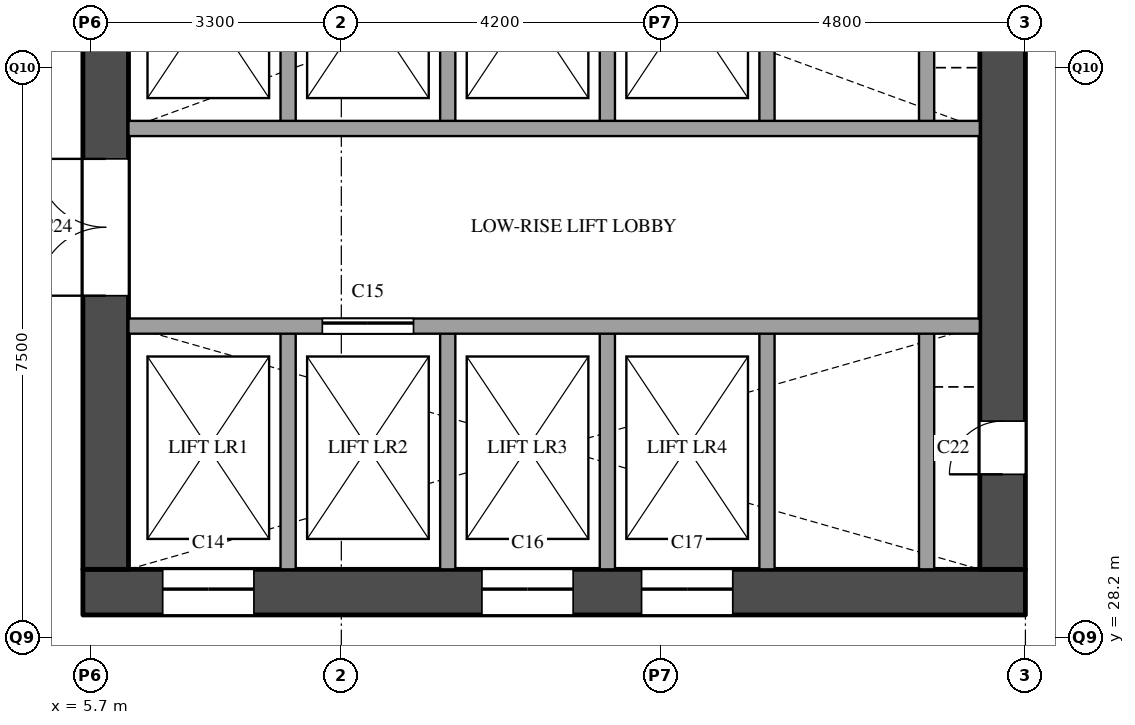
"""IFC4 building model, lengths in metres.
Left out: names, types, materials, properties, quantities, classifications, styles, units other than length and angle.
Written with IfcOpenShell. Run it as: python <this file> out.ifc"""

import sys

from ifc_helpers import new_model, si_unit, direction, frame, frame_2d, origin, place, context, subcontext, project, spatial, rectangle, extrude, element, fill, save


model = new_model("IFC4")
c1 = context("Model", 3, precision=1e-05, world=origin(), true_north=direction((0.0, 1.0)))
c2 = subcontext(c1, "Body", "Model", "MODEL_VIEW")
j1 = project(units=[si_unit("LENGTHUNIT", "METRE"), si_unit("PLANEANGLEUNIT", "RADIAN")], contexts=[c1])
p1 = place(None, origin())
s1 = spatial("IfcSite", under=j1, at=p1, CompositionType="ELEMENT")
p2 = place(p1, origin())
s2 = spatial("IfcBuilding", under=s1, at=p2, CompositionType="ELEMENT")
p3 = place(p2, frame((0.0, 0.0, 42.4)))
s3 = spatial("IfcBuildingStorey", under=s2, at=p3, CompositionType="ELEMENT", Elevation=42.4)
p4 = place(p3, frame((5.6, 28.8, 0.0), z_axis=(0.0, 0.0, 1.0), x_axis=(1.0, 0.0, 0.0)))
e1 = element("IfcWall", 1, at=p4, inside=s3, PredefinedType="SHEAR", context=c2, shape_type="SweptSolid", body=[
    extrude(rectangle(XDim=12.4, YDim=0.6, at=frame_2d((6.2, 0.0))), origin(), (0.0, 0.0, 1.0), 3.5),
])
p5 = place(p4, frame((1.05, 0.0, 0.0)))
e2 = element("IfcOpeningElement", 2, at=p5, cuts=e1, PredefinedType="OPENING", context=c2, shape_type="SweptSolid", body=[
    extrude(rectangle(XDim=1.2, YDim=2.1, at=frame_2d((0.6, 1.05))), frame((0.0, 0.31, 0.0), z_axis=(0.0, -1.0, 0.0), x_axis=(1.0, 0.0, 0.0)), (0.0, 0.0, 1.0), 0.62),
])
p6 = place(p4, frame((5.25, 0.0, 0.0)))
e3 = element("IfcOpeningElement", 3, at=p6, cuts=e1, PredefinedType="OPENING", context=c2, shape_type="SweptSolid", body=[
    extrude(rectangle(XDim=1.2, YDim=2.1, at=frame_2d((0.6, 1.05))), frame((0.0, 0.31, 0.0), z_axis=(0.0, -1.0, 0.0), x_axis=(1.0, 0.0, 0.0)), (0.0, 0.0, 1.0), 0.62),
])
p7 = place(p4, frame((7.35, 0.0, 0.0)))
e4 = element("IfcOpeningElement", 4, at=p7, cuts=e1, PredefinedType="OPENING", context=c2, shape_type="SweptSolid", body=[
    extrude(rectangle(XDim=1.2, YDim=2.1, at=frame_2d((0.6, 1.05))), frame((0.0, 0.31, 0.0), z_axis=(0.0, -1.0, 0.0), x_axis=(1.0, 0.0, 0.0)), (0.0, 0.0, 1.0), 0.62),
])
p8 = place(p3, frame((5.9, 29.1, 0.0), z_axis=(0.0, 0.0, 1.0), x_axis=(0.0, 1.0, 0.0)))
e5 = element("IfcWall", 5, at=p8, inside=s3, PredefinedType="SHEAR", context=c2, shape_type="SweptSolid", body=[
    extrude(rectangle(XDim=20.3, YDim=0.6, at=frame_2d((10.15, 0.0))), origin(), (0.0, 0.0, 1.0), 3.5),
])
p9 = place(p8, frame((3.6, 0.0, 0.0)))
e6 = element("IfcOpeningElement", 6, at=p9, cuts=e5, PredefinedType="OPENING", context=c2, shape_type="SweptSolid", body=[
    extrude(rectangle(XDim=1.8, YDim=2.1, at=frame_2d((0.9, 1.05))), frame((0.0, 0.31, 0.0), z_axis=(0.0, -1.0, 0.0), x_axis=(1.0, 0.0, 0.0)), (0.0, 0.0, 1.0), 0.62),
])
p10 = place(p8, frame((16.4, 0.0, 0.0)))
e7 = element("IfcOpeningElement", 7, at=p10, cuts=e5, PredefinedType="OPENING", context=c2, shape_type="SweptSolid", body=[
    extrude(rectangle(XDim=1.0, YDim=2.1, at=frame_2d((0.5, 1.05))), frame((0.0, 0.31, 0.0), z_axis=(0.0, -1.0, 0.0), x_axis=(1.0, 0.0, 0.0)), (0.0, 0.0, 1.0), 0.62),
])
p11 = place(p3, frame((17.7, 29.1, 0.0), z_axis=(0.0, 0.0, 1.0), x_axis=(0.0, 1.0, 0.0)))
e8 = element("IfcWall", 8, at=p11, inside=s3, PredefinedType="SHEAR", context=c2, shape_type="SweptSolid", body=[
    extrude(rectangle(XDim=20.3, YDim=0.6, at=frame_2d((10.15, 0.0))), origin(), (0.0, 0.0, 1.0), 3.5),
])
p12 = place(p11, frame((1.25, 0.0, 0.0)))
e9 = element("IfcOpeningElement", 9, at=p12, cuts=e8, PredefinedType="OPENING", context=c2, shape_type="SweptSolid", body=[
    extrude(rectangle(XDim=0.7, YDim=2.1, at=frame_2d((0.35, 1.05))), frame((0.0, 0.31, 0.0), z_axis=(0.0, -1.0, 0.0), x_axis=(1.0, 0.0, 0.0)), (0.0, 0.0, 1.0), 0.62),
])
p13 = place(p11, frame((7.05, 0.0, 0.0)))
e10 = element("IfcOpeningElement", 10, at=p13, cuts=e8, PredefinedType="OPENING", context=c2, shape_type="SweptSolid", body=[
    extrude(rectangle(XDim=0.7, YDim=2.1, at=frame_2d((0.35, 1.05))), frame((0.0, 0.31, 0.0), z_axis=(0.0, -1.0, 0.0), x_axis=(1.0, 0.0, 0.0)), (0.0, 0.0, 1.0), 0.62),
])
p14 = place(p3, frame((8.3, 29.1, 0.0), z_axis=(0.0, 0.0, 1.0), x_axis=(0.0, 1.0, 0.0)))
e11 = element("IfcWall", 11, at=p14, inside=s3, PredefinedType="SOLIDWALL", context=c2, shape_type="SweptSolid", body=[
    extrude(rectangle(XDim=3.2, YDim=0.2, at=frame_2d((1.6, 0.0))), origin(), (0.0, 0.0, 1.0), 3.5),
])
p15 = place(p3, frame((8.3, 34.9, 0.0), z_axis=(0.0, 0.0, 1.0), x_axis=(0.0, 1.0, 0.0)))
e12 = element("IfcWall", 12, at=p15, inside=s3, PredefinedType="SOLIDWALL", context=c2, shape_type="SweptSolid", body=[
    extrude(rectangle(XDim=3.2, YDim=0.2, at=frame_2d((1.6, 0.0))), origin(), (0.0, 0.0, 1.0), 3.5),
])
p16 = place(p3, frame((10.4, 29.1, 0.0), z_axis=(0.0, 0.0, 1.0), x_axis=(0.0, 1.0, 0.0)))
e13 = element("IfcWall", 13, at=p16, inside=s3, PredefinedType="SOLIDWALL", context=c2, shape_type="SweptSolid", body=[
    extrude(rectangle(XDim=3.2, YDim=0.2, at=frame_2d((1.6, 0.0))), origin(), (0.0, 0.0, 1.0), 3.5),
])
p17 = place(p3, frame((10.4, 34.9, 0.0), z_axis=(0.0, 0.0, 1.0), x_axis=(0.0, 1.0, 0.0)))
e14 = element("IfcWall", 14, at=p17, inside=s3, PredefinedType="SOLIDWALL", context=c2, shape_type="SweptSolid", body=[
    extrude(rectangle(XDim=3.2, YDim=0.2, at=frame_2d((1.6, 0.0))), origin(), (0.0, 0.0, 1.0), 3.5),
])
p18 = place(p3, frame((12.5, 29.1, 0.0), z_axis=(0.0, 0.0, 1.0), x_axis=(0.0, 1.0, 0.0)))
e15 = element("IfcWall", 15, at=p18, inside=s3, PredefinedType="SOLIDWALL", context=c2, shape_type="SweptSolid", body=[
    extrude(rectangle(XDim=3.2, YDim=0.2, at=frame_2d((1.6, 0.0))), origin(), (0.0, 0.0, 1.0), 3.5),
])
p19 = place(p3, frame((12.5, 34.9, 0.0), z_axis=(0.0, 0.0, 1.0), x_axis=(0.0, 1.0, 0.0)))
e16 = element("IfcWall", 16, at=p19, inside=s3, PredefinedType="SOLIDWALL", context=c2, shape_type="SweptSolid", body=[
    extrude(rectangle(XDim=3.2, YDim=0.2, at=frame_2d((1.6, 0.0))), origin(), (0.0, 0.0, 1.0), 3.5),
])
p20 = place(p3, frame((14.6, 29.1, 0.0), z_axis=(0.0, 0.0, 1.0), x_axis=(0.0, 1.0, 0.0)))
e17 = element("IfcWall", 17, at=p20, inside=s3, PredefinedType="SOLIDWALL", context=c2, shape_type="SweptSolid", body=[
    extrude(rectangle(XDim=3.2, YDim=0.2, at=frame_2d((1.6, 0.0))), origin(), (0.0, 0.0, 1.0), 3.5),
])
p21 = place(p3, frame((14.6, 34.9, 0.0), z_axis=(0.0, 0.0, 1.0), x_axis=(0.0, 1.0, 0.0)))
e18 = element("IfcWall", 18, at=p21, inside=s3, PredefinedType="SOLIDWALL", context=c2, shape_type="SweptSolid", body=[
    extrude(rectangle(XDim=3.2, YDim=0.2, at=frame_2d((1.6, 0.0))), origin(), (0.0, 0.0, 1.0), 3.5),
])
p22 = place(p3, frame((16.7, 29.1, 0.0), z_axis=(0.0, 0.0, 1.0), x_axis=(0.0, 1.0, 0.0)))
e19 = element("IfcWall", 19, at=p22, inside=s3, PredefinedType="SOLIDWALL", context=c2, shape_type="SweptSolid", body=[
    extrude(rectangle(XDim=3.2, YDim=0.2, at=frame_2d((1.6, 0.0))), origin(), (0.0, 0.0, 1.0), 3.5),
])
p23 = place(p3, frame((16.7, 34.9, 0.0), z_axis=(0.0, 0.0, 1.0), x_axis=(0.0, 1.0, 0.0)))
e20 = element("IfcWall", 20, at=p23, inside=s3, PredefinedType="SOLIDWALL", context=c2, shape_type="SweptSolid", body=[
    extrude(rectangle(XDim=3.2, YDim=0.2, at=frame_2d((1.6, 0.0))), origin(), (0.0, 0.0, 1.0), 3.5),
])
p24 = place(p3, frame((6.2, 32.3, 0.0), z_axis=(0.0, 0.0, 1.0), x_axis=(1.0, 0.0, 0.0)))
e21 = element("IfcWall", 21, at=p24, inside=s3, PredefinedType="SOLIDWALL", context=c2, shape_type="SweptSolid", body=[
    extrude(rectangle(XDim=11.2, YDim=0.2, at=frame_2d((5.6, 0.0))), origin(), (0.0, 0.0, 1.0), 3.5),
])
p25 = place(p24, frame((2.55, 0.0, 0.0)))
e22 = element("IfcOpeningElement", 22, at=p25, cuts=e21, PredefinedType="OPENING", context=c2, shape_type="SweptSolid", body=[
    extrude(rectangle(XDim=1.2, YDim=2.1, at=frame_2d((0.6, 1.05))), frame((0.0, 0.11, 0.0), z_axis=(0.0, -1.0, 0.0), x_axis=(1.0, 0.0, 0.0)), (0.0, 0.0, 1.0), 0.22),
])
p26 = place(p3, frame((6.2, 34.9, 0.0), z_axis=(0.0, 0.0, 1.0), x_axis=(1.0, 0.0, 0.0)))
e23 = element("IfcWall", 23, at=p26, inside=s3, PredefinedType="SOLIDWALL", context=c2, shape_type="SweptSolid", body=[
    extrude(rectangle(XDim=11.2, YDim=0.2, at=frame_2d((5.6, 0.0))), origin(), (0.0, 0.0, 1.0), 3.5),
])
p27 = place(p5, origin())
e24 = element("IfcDoor", 24, at=p27, inside=s3, OperationType="SLIDING_TO_LEFT", PredefinedType="DOOR", context=c2, shape_type="SweptSolid", body=[
    extrude(rectangle(XDim=1.2, YDim=2.1, at=frame_2d((0.6, 1.05))), frame((0.0, 0.025, 0.0), z_axis=(0.0, -1.0, 0.0), x_axis=(1.0, 0.0, 0.0)), (0.0, 0.0, 1.0), 0.05),
])
fill(e2, e24)
p28 = place(p25, origin())
e25 = element("IfcDoor", 25, at=p28, inside=s3, OperationType="SLIDING_TO_LEFT", PredefinedType="DOOR", context=c2, shape_type="SweptSolid", body=[
    extrude(rectangle(XDim=1.2, YDim=2.1, at=frame_2d((0.6, 1.05))), frame((0.0, 0.025, 0.0), z_axis=(0.0, -1.0, 0.0), x_axis=(1.0, 0.0, 0.0)), (0.0, 0.0, 1.0), 0.05),
])
fill(e22, e25)
p29 = place(p6, origin())
e26 = element("IfcDoor", 26, at=p29, inside=s3, OperationType="SLIDING_TO_LEFT", PredefinedType="DOOR", context=c2, shape_type="SweptSolid", body=[
    extrude(rectangle(XDim=1.2, YDim=2.1, at=frame_2d((0.6, 1.05))), frame((0.0, 0.025, 0.0), z_axis=(0.0, -1.0, 0.0), x_axis=(1.0, 0.0, 0.0)), (0.0, 0.0, 1.0), 0.05),
])
fill(e3, e26)
p30 = place(p7, origin())
e27 = element("IfcDoor", 27, at=p30, inside=s3, OperationType="SLIDING_TO_LEFT", PredefinedType="DOOR", context=c2, shape_type="SweptSolid", body=[
    extrude(rectangle(XDim=1.2, YDim=2.1, at=frame_2d((0.6, 1.05))), frame((0.0, 0.025, 0.0), z_axis=(0.0, -1.0, 0.0), x_axis=(1.0, 0.0, 0.0)), (0.0, 0.0, 1.0), 0.05),
])
fill(e4, e27)
p31 = place(p12, origin())
e28 = element("IfcDoor", 28, at=p31, inside=s3, OperationType="SINGLE_SWING_LEFT", PredefinedType="DOOR", context=c2, shape_type="SweptSolid", body=[
    extrude(rectangle(XDim=0.7, YDim=2.1, at=frame_2d((0.35, 1.05))), frame((0.0, 0.025, 0.0), z_axis=(0.0, -1.0, 0.0), x_axis=(1.0, 0.0, 0.0)), (0.0, 0.0, 1.0), 0.05),
])
fill(e9, e28)
p32 = place(p9, origin())
e29 = element("IfcDoor", 29, at=p32, inside=s3, OperationType="DOUBLE_DOOR_SINGLE_SWING", PredefinedType="DOOR", context=c2, shape_type="SweptSolid", body=[
    extrude(rectangle(XDim=1.8, YDim=2.1, at=frame_2d((0.9, 1.05))), frame((0.0, 0.025, 0.0), z_axis=(0.0, -1.0, 0.0), x_axis=(1.0, 0.0, 0.0)), (0.0, 0.0, 1.0), 0.05),
])
fill(e6, e29)
save(model, sys.argv[1])
